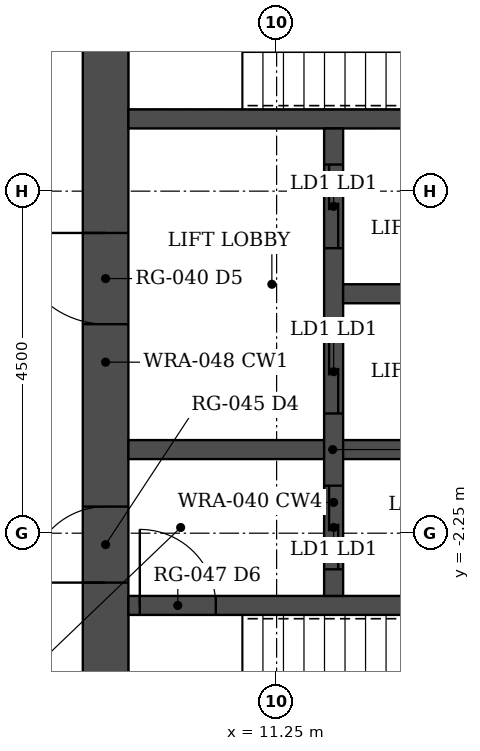
"""IFC4 building model, lengths in metres.
Left out: names, types, materials, properties, quantities, classifications, styles, units other than length and angle.
Written with IfcOpenShell. Run it as: python <this file> out.ifc"""

import sys

from ifc_helpers import new_model, si_unit, direction, frame, frame_2d, origin, place, context, subcontext, project, spatial, rectangle, extrude, element, fill, save


model = new_model("IFC4")
c1 = context("Model", 3, precision=1e-05, world=origin(), true_north=direction((0.0, 1.0)))
c2 = subcontext(c1, "Body", "Model", "MODEL_VIEW")
j1 = project(units=[si_unit("LENGTHUNIT", "METRE"), si_unit("PLANEANGLEUNIT", "RADIAN")], contexts=[c1])
p1 = place(None, origin())
s1 = spatial("IfcSite", under=j1, at=p1, CompositionType="ELEMENT")
p2 = place(p1, origin())
s2 = spatial("IfcBuilding", under=s1, at=p2, CompositionType="ELEMENT")
p3 = place(p2, frame((0.0, 0.0, 89.5)))
s3 = spatial("IfcBuildingStorey", under=s2, at=p3, CompositionType="ELEMENT", Elevation=89.5)
p4 = place(p3, frame((9.0, -6.45, 0.0), z_axis=(0.0, 0.0, 1.0), x_axis=(0.0, 1.0, 0.0)))
e1 = element("IfcWall", 1, at=p4, inside=s3, PredefinedType="SHEAR", context=c2, shape_type="SweptSolid", body=[
    extrude(rectangle(XDim=12.9, YDim=0.6, at=frame_2d((6.45, 0.0))), origin(), (0.0, 0.0, 1.0), 3.5),
])
p5 = place(p4, frame((3.55, 0.0, 0.0)))
e2 = element("IfcOpeningElement", 2, at=p5, cuts=e1, PredefinedType="OPENING", context=c2, shape_type="SweptSolid", body=[
    extrude(rectangle(XDim=1.0, YDim=2.1, at=frame_2d((0.5, 1.05))), frame((0.0, 0.31, 0.0), z_axis=(0.0, -1.0, 0.0), x_axis=(1.0, 0.0, 0.0)), (0.0, 0.0, 1.0), 0.62),
])
p6 = place(p4, frame((6.95, 0.0, 0.0)))
e3 = element("IfcOpeningElement", 3, at=p6, cuts=e1, PredefinedType="OPENING", context=c2, shape_type="SweptSolid", body=[
    extrude(rectangle(XDim=1.2, YDim=2.1, at=frame_2d((0.6, 1.05))), frame((0.0, 0.31, 0.0), z_axis=(0.0, -1.0, 0.0), x_axis=(1.0, 0.0, 0.0)), (0.0, 0.0, 1.0), 0.62),
])
p7 = place(p4, frame((10.85, 0.0, 0.0)))
e4 = element("IfcOpeningElement", 4, at=p7, cuts=e1, PredefinedType="OPENING", context=c2, shape_type="SweptSolid", body=[
    extrude(rectangle(XDim=1.0, YDim=2.1, at=frame_2d((0.5, 1.05))), frame((0.0, 0.31, 0.0), z_axis=(0.0, -1.0, 0.0), x_axis=(1.0, 0.0, 0.0)), (0.0, 0.0, 1.0), 0.62),
])
p8 = place(p3, frame((9.3, -3.2, 0.0), z_axis=(0.0, 0.0, 1.0), x_axis=(1.0, 0.0, 0.0)))
e5 = element("IfcWall", 5, at=p8, inside=s3, PredefinedType="SHEAR", context=c2, shape_type="SweptSolid", body=[
    extrude(rectangle(XDim=8.4, YDim=0.25, at=frame_2d((4.2, 0.0))), origin(), (0.0, 0.0, 1.0), 3.5),
])
p9 = place(p8, frame((0.15, 0.0, 0.0)))
e6 = element("IfcOpeningElement", 6, at=p9, cuts=e5, PredefinedType="OPENING", context=c2, shape_type="SweptSolid", body=[
    extrude(rectangle(XDim=1.0, YDim=2.1, at=frame_2d((0.5, 1.05))), frame((0.0, 0.135, 0.0), z_axis=(0.0, -1.0, 0.0), x_axis=(1.0, 0.0, 0.0)), (0.0, 0.0, 1.0), 0.27),
])
p10 = place(p3, frame((9.3, 3.2, 0.0), z_axis=(0.0, 0.0, 1.0), x_axis=(1.0, 0.0, 0.0)))
e7 = element("IfcWall", 7, at=p10, inside=s3, PredefinedType="SHEAR", context=c2, shape_type="SweptSolid", body=[
    extrude(rectangle(XDim=8.4, YDim=0.25, at=frame_2d((4.2, 0.0))), origin(), (0.0, 0.0, 1.0), 3.5),
])
p11 = place(p3, frame((9.3, -1.15, 0.0), z_axis=(0.0, 0.0, 1.0), x_axis=(1.0, 0.0, 0.0)))
e8 = element("IfcWall", 8, at=p11, inside=s3, PredefinedType="SHEAR", context=c2, shape_type="SweptSolid", body=[
    extrude(rectangle(XDim=5.375, YDim=0.25, at=frame_2d((2.688, 0.0))), origin(), (0.0, 0.0, 1.0), 3.5),
])
p12 = place(p3, frame((12.0, -3.075, 0.0), z_axis=(0.0, 0.0, 1.0), x_axis=(0.0, 1.0, 0.0)))
e9 = element("IfcWall", 9, at=p12, inside=s3, PredefinedType="SHEAR", context=c2, shape_type="SweptSolid", body=[
    extrude(rectangle(XDim=6.15, YDim=0.25, at=frame_2d((3.075, 0.0))), origin(), (0.0, 0.0, 1.0), 3.5),
])
p13 = place(p12, frame((0.35, 0.0, 0.0)))
e10 = element("IfcOpeningElement", 10, at=p13, cuts=e9, PredefinedType="OPENING", context=c2, shape_type="SweptSolid", body=[
    extrude(rectangle(XDim=1.1, YDim=2.1, at=frame_2d((0.55, 1.05))), frame((0.0, 0.135, 0.0), z_axis=(0.0, -1.0, 0.0), x_axis=(1.0, 0.0, 0.0)), (0.0, 0.0, 1.0), 0.27),
])
p14 = place(p12, frame((2.4, 0.0, 0.0)))
e11 = element("IfcOpeningElement", 11, at=p14, cuts=e9, PredefinedType="OPENING", context=c2, shape_type="SweptSolid", body=[
    extrude(rectangle(XDim=1.1, YDim=2.1, at=frame_2d((0.55, 1.05))), frame((0.0, 0.135, 0.0), z_axis=(0.0, -1.0, 0.0), x_axis=(1.0, 0.0, 0.0)), (0.0, 0.0, 1.0), 0.27),
])
p15 = place(p12, frame((4.575, 0.0, 0.0)))
e12 = element("IfcOpeningElement", 12, at=p15, cuts=e9, PredefinedType="OPENING", context=c2, shape_type="SweptSolid", body=[
    extrude(rectangle(XDim=1.1, YDim=2.1, at=frame_2d((0.55, 1.05))), frame((0.0, 0.135, 0.0), z_axis=(0.0, -1.0, 0.0), x_axis=(1.0, 0.0, 0.0)), (0.0, 0.0, 1.0), 0.27),
])
p16 = place(p3, frame((12.125, 0.9, 0.0), z_axis=(0.0, 0.0, 1.0), x_axis=(1.0, 0.0, 0.0)))
e13 = element("IfcWall", 13, at=p16, inside=s3, PredefinedType="SHEAR", context=c2, shape_type="SweptSolid", body=[
    extrude(rectangle(XDim=2.55, YDim=0.25, at=frame_2d((1.275, 0.0))), origin(), (0.0, 0.0, 1.0), 3.5),
])
p17 = place(p5, origin())
e14 = element("IfcDoor", 14, at=p17, inside=s3, OperationType="SINGLE_SWING_LEFT", PredefinedType="DOOR", context=c2, shape_type="SweptSolid", body=[
    extrude(rectangle(XDim=1.0, YDim=2.1, at=frame_2d((0.5, 1.05))), frame((0.0, 0.025, 0.0), z_axis=(0.0, -1.0, 0.0), x_axis=(1.0, 0.0, 0.0)), (0.0, 0.0, 1.0), 0.05),
])
fill(e2, e14)
p18 = place(p9, origin())
e15 = element("IfcDoor", 15, at=p18, inside=s3, OperationType="SINGLE_SWING_LEFT", PredefinedType="DOOR", context=c2, shape_type="SweptSolid", body=[
    extrude(rectangle(XDim=1.0, YDim=2.1, at=frame_2d((0.5, 1.05))), frame((0.0, 0.025, 0.0), z_axis=(0.0, -1.0, 0.0), x_axis=(1.0, 0.0, 0.0)), (0.0, 0.0, 1.0), 0.05),
])
fill(e6, e15)
p19 = place(p6, origin())
e16 = element("IfcDoor", 16, at=p19, inside=s3, OperationType="SINGLE_SWING_RIGHT", PredefinedType="DOOR", context=c2, shape_type="SweptSolid", body=[
    extrude(rectangle(XDim=1.2, YDim=2.1, at=frame_2d((0.6, 1.05))), frame((0.0, 0.025, 0.0), z_axis=(0.0, -1.0, 0.0), x_axis=(1.0, 0.0, 0.0)), (0.0, 0.0, 1.0), 0.05),
])
fill(e3, e16)
p20 = place(p13, origin())
e17 = element("IfcDoor", 17, at=p20, inside=s3, OperationType="DOUBLE_DOOR_SLIDING", PredefinedType="DOOR", context=c2, shape_type="SweptSolid", body=[
    extrude(rectangle(XDim=1.1, YDim=2.1, at=frame_2d((0.55, 1.05))), frame((0.0, 0.025, 0.0), z_axis=(0.0, -1.0, 0.0), x_axis=(1.0, 0.0, 0.0)), (0.0, 0.0, 1.0), 0.05),
])
fill(e10, e17)
p21 = place(p14, origin())
e18 = element("IfcDoor", 18, at=p21, inside=s3, OperationType="DOUBLE_DOOR_SLIDING", PredefinedType="DOOR", context=c2, shape_type="SweptSolid", body=[
    extrude(rectangle(XDim=1.1, YDim=2.1, at=frame_2d((0.55, 1.05))), frame((0.0, 0.025, 0.0), z_axis=(0.0, -1.0, 0.0), x_axis=(1.0, 0.0, 0.0)), (0.0, 0.0, 1.0), 0.05),
])
fill(e11, e18)
p22 = place(p15, origin())
e19 = element("IfcDoor", 19, at=p22, inside=s3, OperationType="DOUBLE_DOOR_SLIDING", PredefinedType="DOOR", context=c2, shape_type="SweptSolid", body=[
    extrude(rectangle(XDim=1.1, YDim=2.1, at=frame_2d((0.55, 1.05))), frame((0.0, 0.025, 0.0), z_axis=(0.0, -1.0, 0.0), x_axis=(1.0, 0.0, 0.0)), (0.0, 0.0, 1.0), 0.05),
])
fill(e12, e19)
save(model, sys.argv[1])
